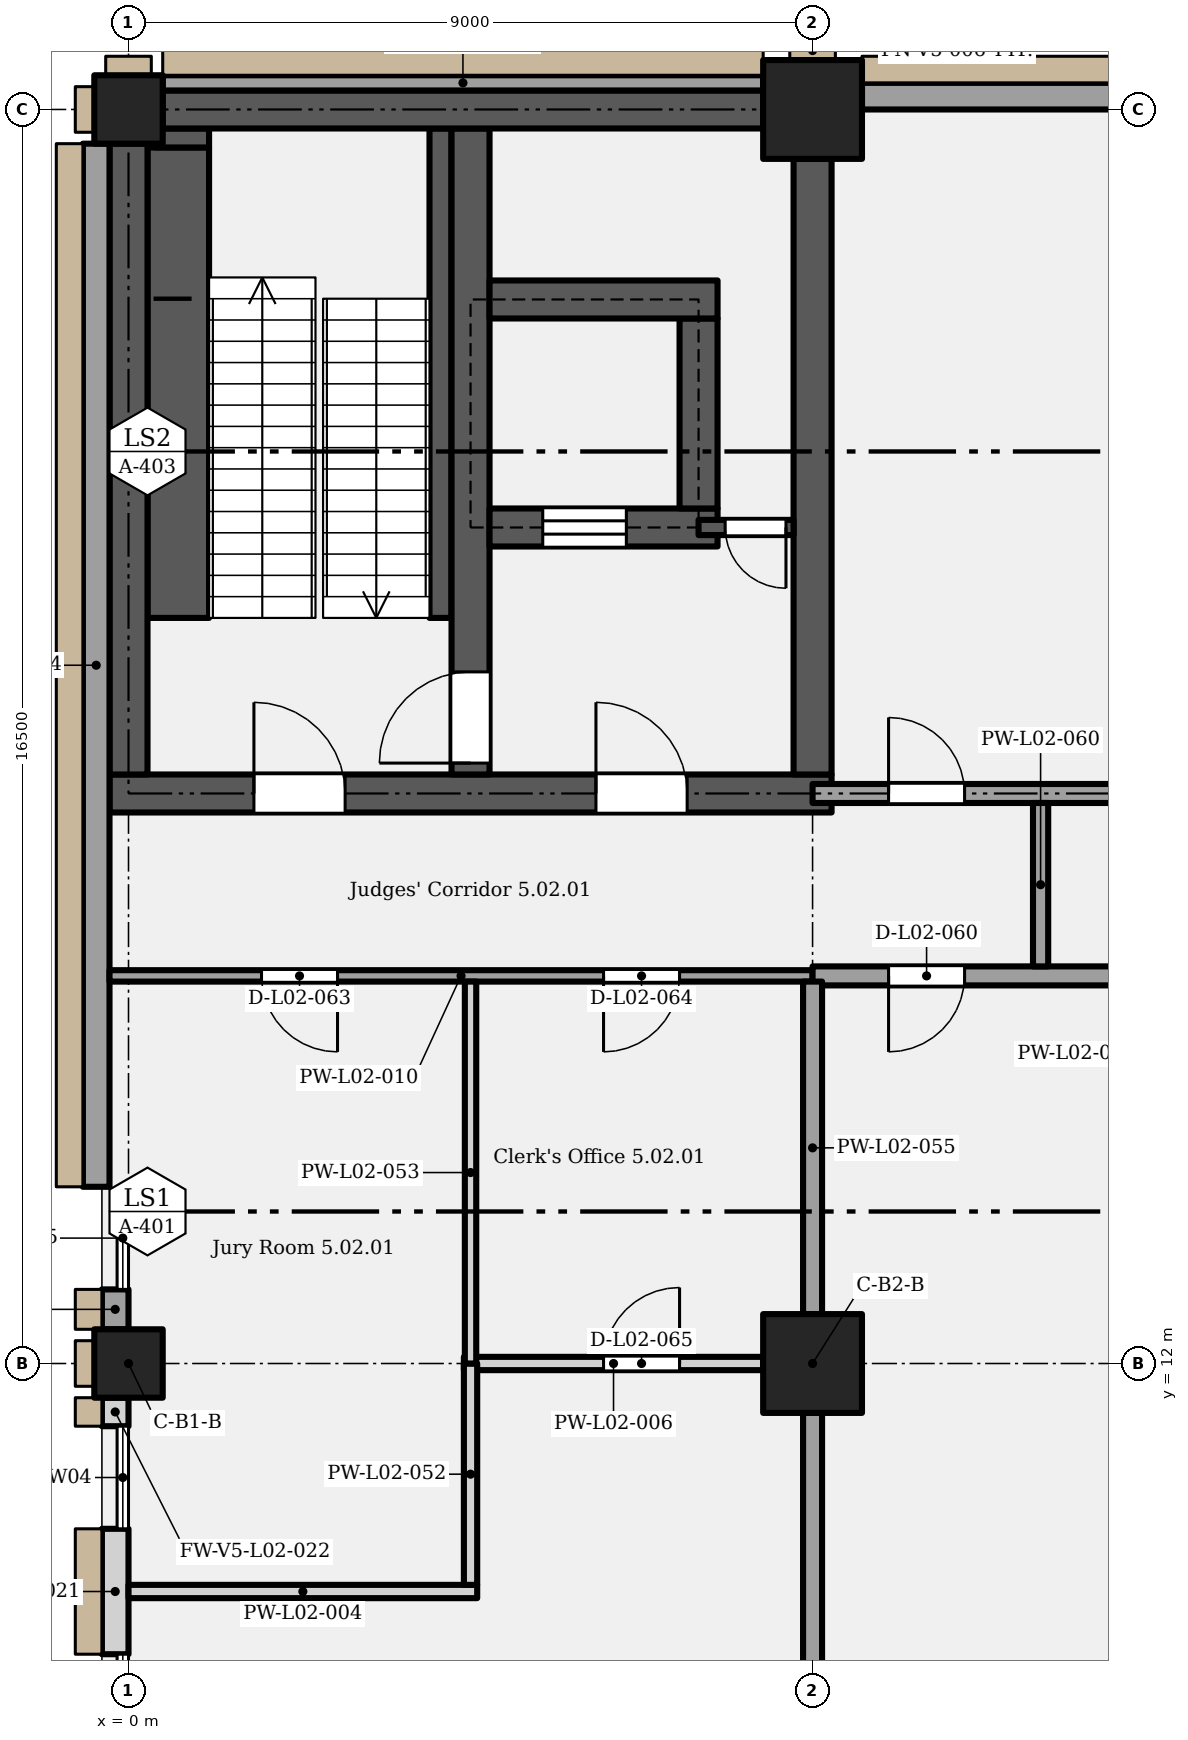
"""IFC4 building model, lengths in metres.
Left out: names, types, materials, properties, quantities, classifications, styles, units other than length and angle.
Written with IfcOpenShell. Run it as: python <this file> out.ifc"""

import sys

from ifc_helpers import new_model, si_unit, direction, frame, frame_2d, origin, origin_2d, place, context, subcontext, project, spatial, rectangle, extrude, element, fill, save


model = new_model("IFC4")
c1 = context("Model", 3, precision=1e-05, world=origin(), true_north=direction((0.0, 1.0)))
c2 = subcontext(c1, "Body", "Model", "MODEL_VIEW")
j1 = project(units=[si_unit("LENGTHUNIT", "METRE"), si_unit("PLANEANGLEUNIT", "RADIAN")], contexts=[c1])
p1 = place(None, origin())
s1 = spatial("IfcSite", under=j1, at=p1, CompositionType="ELEMENT")
p2 = place(p1, origin())
s2 = spatial("IfcBuilding", under=s1, at=p2, CompositionType="ELEMENT")
p3 = place(p2, frame((0.0, 0.0, 12.0)))
s3 = spatial("IfcBuildingStorey", under=s2, at=p3, CompositionType="ELEMENT", Elevation=12.0)
p4 = place(p3, frame((0.0, 12.0, 0.0), z_axis=(0.0, 0.0, 1.0), x_axis=(1.0, 0.0, 0.0)))
e1 = element("IfcColumn", 1, at=p4, inside=s3, PredefinedType="COLUMN", context=c2, shape_type="SweptSolid", body=[
    extrude(rectangle(XDim=0.9, YDim=0.9, at=origin_2d()), origin(), (0.0, 0.0, 1.0), 5.4),
])
p5 = place(p3, frame((9.0, 12.0, 0.0), z_axis=(0.0, 0.0, 1.0), x_axis=(1.0, 0.0, 0.0)))
e2 = element("IfcColumn", 2, at=p5, inside=s3, PredefinedType="COLUMN", context=c2, shape_type="SweptSolid", body=[
    extrude(rectangle(XDim=1.3, YDim=1.3, at=origin_2d()), origin(), (0.0, 0.0, 1.0), 5.4),
])
p6 = place(p3, frame((0.0, 28.5, 0.0), z_axis=(0.0, 0.0, 1.0), x_axis=(1.0, 0.0, 0.0)))
e3 = element("IfcColumn", 3, at=p6, inside=s3, PredefinedType="COLUMN", context=c2, shape_type="SweptSolid", body=[
    extrude(rectangle(XDim=0.9, YDim=0.9, at=origin_2d()), origin(), (0.0, 0.0, 1.0), 5.4),
])
p7 = place(p3, frame((9.0, 28.5, 0.0), z_axis=(0.0, 0.0, 1.0), x_axis=(1.0, 0.0, 0.0)))
e4 = element("IfcColumn", 4, at=p7, inside=s3, PredefinedType="COLUMN", context=c2, shape_type="SweptSolid", body=[
    extrude(rectangle(XDim=1.3, YDim=1.3, at=origin_2d()), origin(), (0.0, 0.0, 1.0), 5.4),
])
p8 = place(p3, frame((-0.25, 19.5, 0.0), z_axis=(0.0, 0.0, 1.0), x_axis=(1.0, 0.0, 0.0)))
e5 = element("IfcWall", 5, at=p8, inside=s3, PredefinedType="SHEAR", context=c2, shape_type="SweptSolid", body=[
    extrude(rectangle(XDim=9.5, YDim=0.5, at=frame_2d((4.75, 0.0))), origin(), (0.0, 0.0, 1.0), 5.15),
])
p9 = place(p8, frame((1.9, 0.0, 0.0)))
e6 = element("IfcOpeningElement", 6, at=p9, cuts=e5, PredefinedType="OPENING", context=c2, shape_type="SweptSolid", body=[
    extrude(rectangle(XDim=1.2, YDim=2.1, at=frame_2d((0.6, 1.05))), frame((0.0, 0.26, 0.0), z_axis=(0.0, -1.0, 0.0), x_axis=(1.0, 0.0, 0.0)), (0.0, 0.0, 1.0), 0.52),
])
p10 = place(p8, frame((6.4, 0.0, 0.0)))
e7 = element("IfcOpeningElement", 7, at=p10, cuts=e5, PredefinedType="OPENING", context=c2, shape_type="SweptSolid", body=[
    extrude(rectangle(XDim=1.2, YDim=2.1, at=frame_2d((0.6, 1.05))), frame((0.0, 0.26, 0.0), z_axis=(0.0, -1.0, 0.0), x_axis=(1.0, 0.0, 0.0)), (0.0, 0.0, 1.0), 0.52),
])
p11 = place(p3, frame((0.0, 19.75, 0.0), z_axis=(0.0, 0.0, 1.0), x_axis=(0.0, 1.0, 0.0)))
e8 = element("IfcWall", 8, at=p11, inside=s3, PredefinedType="SHEAR", context=c2, shape_type="SweptSolid", body=[
    extrude(rectangle(XDim=8.3, YDim=0.5, at=frame_2d((4.15, 0.0))), origin(), (0.0, 0.0, 1.0), 5.15),
])
p12 = place(p3, frame((4.5, 19.75, 0.0), z_axis=(0.0, 0.0, 1.0), x_axis=(0.0, 1.0, 0.0)))
e9 = element("IfcWall", 9, at=p12, inside=s3, PredefinedType="SHEAR", context=c2, shape_type="SweptSolid", body=[
    extrude(rectangle(XDim=8.5, YDim=0.5, at=frame_2d((4.25, 0.0))), origin(), (0.0, 0.0, 1.0), 5.15),
])
p13 = place(p12, frame((0.15, 0.0, 0.0)))
e10 = element("IfcOpeningElement", 10, at=p13, cuts=e9, PredefinedType="OPENING", context=c2, shape_type="SweptSolid", body=[
    extrude(rectangle(XDim=1.2, YDim=2.1, at=frame_2d((0.6, 1.05))), frame((0.0, 0.26, 0.0), z_axis=(0.0, -1.0, 0.0), x_axis=(1.0, 0.0, 0.0)), (0.0, 0.0, 1.0), 0.52),
])
p14 = place(p3, frame((9.0, 19.75, 0.0), z_axis=(0.0, 0.0, 1.0), x_axis=(0.0, 1.0, 0.0)))
e11 = element("IfcWall", 11, at=p14, inside=s3, PredefinedType="SHEAR", context=c2, shape_type="SweptSolid", body=[
    extrude(rectangle(XDim=8.1, YDim=0.5, at=frame_2d((4.05, 0.0))), origin(), (0.0, 0.0, 1.0), 5.15),
])
p15 = place(p3, frame((4.75, 23.0, 0.0), z_axis=(0.0, 0.0, 1.0), x_axis=(1.0, 0.0, 0.0)))
e12 = element("IfcWall", 12, at=p15, inside=s3, PredefinedType="SHEAR", context=c2, shape_type="SweptSolid", body=[
    extrude(rectangle(XDim=3.0, YDim=0.5, at=frame_2d((1.5, 0.0))), origin(), (0.0, 0.0, 1.0), 5.15),
])
p16 = place(p15, frame((0.7, 0.0, 0.0)))
e13 = element("IfcOpeningElement", 13, at=p16, cuts=e12, PredefinedType="OPENING", context=c2, shape_type="SweptSolid", body=[
    extrude(rectangle(XDim=1.1, YDim=2.1, at=frame_2d((0.55, 1.05))), frame((0.0, 0.26, 0.0), z_axis=(0.0, -1.0, 0.0), x_axis=(1.0, 0.0, 0.0)), (0.0, 0.0, 1.0), 0.52),
])
p17 = place(p3, frame((7.5, 23.25, 0.0), z_axis=(0.0, 0.0, 1.0), x_axis=(0.0, 1.0, 0.0)))
e14 = element("IfcWall", 14, at=p17, inside=s3, PredefinedType="SHEAR", context=c2, shape_type="SweptSolid", body=[
    extrude(rectangle(XDim=2.5, YDim=0.5, at=frame_2d((1.25, 0.0))), origin(), (0.0, 0.0, 1.0), 5.15),
])
p18 = place(p3, frame((4.75, 26.0, 0.0), z_axis=(0.0, 0.0, 1.0), x_axis=(1.0, 0.0, 0.0)))
e15 = element("IfcWall", 15, at=p18, inside=s3, PredefinedType="SHEAR", context=c2, shape_type="SweptSolid", body=[
    extrude(rectangle(XDim=3.0, YDim=0.5, at=frame_2d((1.5, 0.0))), origin(), (0.0, 0.0, 1.0), 5.15),
])
p19 = place(p3, frame((0.45, 28.5, 0.0), z_axis=(0.0, 0.0, 1.0), x_axis=(1.0, 0.0, 0.0)))
e16 = element("IfcWall", 16, at=p19, inside=s3, PredefinedType="SHEAR", context=c2, shape_type="SweptSolid", body=[
    extrude(rectangle(XDim=7.9, YDim=0.5, at=frame_2d((3.95, 0.0))), origin(), (0.0, 0.0, 1.0), 5.15),
])
p20 = place(p3, frame((0.45, 28.85, 0.0), z_axis=(0.0, 0.0, 1.0), x_axis=(1.0, 0.0, 0.0)))
e17 = element("IfcWall", 17, at=p20, inside=s3, PredefinedType="SOLIDWALL", context=c2, shape_type="SweptSolid", body=[
    extrude(rectangle(XDim=7.9, YDim=0.2, at=frame_2d((3.95, 0.0))), origin(), (0.0, 0.0, 1.0), 5.15),
])
p21 = place(p3, frame((9.65, 28.675, 0.0), z_axis=(0.0, 0.0, 1.0), x_axis=(1.0, 0.0, 0.0)))
e18 = element("IfcWall", 18, at=p21, inside=s3, PredefinedType="SOLIDWALL", context=c2, shape_type="SweptSolid", body=[
    extrude(rectangle(XDim=7.7, YDim=0.35, at=frame_2d((3.85, 0.0))), origin(), (0.0, 0.0, 1.0), 5.15),
])
p22 = place(p3, frame((-0.175, 8.175, 0.0), z_axis=(0.0, 0.0, 1.0), x_axis=(0.0, 1.0, 0.0)))
e19 = element("IfcWall", 19, at=p22, inside=s3, PredefinedType="SOLIDWALL", context=c2, shape_type="SweptSolid", body=[
    extrude(rectangle(XDim=1.65, YDim=0.35, at=frame_2d((0.825, 0.0))), origin(), (0.0, 0.0, 1.0), 5.15),
])
p23 = place(p3, frame((-0.175, 11.175, 0.0), z_axis=(0.0, 0.0, 1.0), x_axis=(0.0, 1.0, 0.0)))
e20 = element("IfcWall", 20, at=p23, inside=s3, PredefinedType="SOLIDWALL", context=c2, shape_type="SweptSolid", body=[
    extrude(rectangle(XDim=0.375, YDim=0.35, at=frame_2d((0.188, 0.0))), origin(), (0.0, 0.0, 1.0), 5.15),
])
p24 = place(p3, frame((-0.175, 12.45, 0.0), z_axis=(0.0, 0.0, 1.0), x_axis=(0.0, 1.0, 0.0)))
e21 = element("IfcWall", 21, at=p24, inside=s3, PredefinedType="SOLIDWALL", context=c2, shape_type="SweptSolid", body=[
    extrude(rectangle(XDim=0.525, YDim=0.35, at=frame_2d((0.263, 0.0))), origin(), (0.0, 0.0, 1.0), 5.15),
])
p25 = place(p3, frame((-0.425, 14.325, 0.0), z_axis=(0.0, 0.0, 1.0), x_axis=(0.0, 1.0, 0.0)))
e22 = element("IfcWall", 22, at=p25, inside=s3, PredefinedType="SOLIDWALL", context=c2, shape_type="SweptSolid", body=[
    extrude(rectangle(XDim=13.725, YDim=0.35, at=frame_2d((6.863, 0.0))), origin(), (0.0, 0.0, 1.0), 5.15),
])
p26 = place(p3, frame((0.0, 9.0, 0.0), z_axis=(0.0, 0.0, 1.0), x_axis=(1.0, 0.0, 0.0)))
e23 = element("IfcWall", 23, at=p26, inside=s3, PredefinedType="PARTITIONING", context=c2, shape_type="SweptSolid", body=[
    extrude(rectangle(XDim=4.587, YDim=0.175, at=frame_2d((2.294, 0.0))), origin(), (0.0, 0.0, 1.0), 5.15),
])
p27 = place(p3, frame((4.413, 12.0, 0.0), z_axis=(0.0, 0.0, 1.0), x_axis=(1.0, 0.0, 0.0)))
e24 = element("IfcWall", 24, at=p27, inside=s3, PredefinedType="PARTITIONING", context=c2, shape_type="SweptSolid", body=[
    extrude(rectangle(XDim=3.938, YDim=0.175, at=frame_2d((1.969, 0.0))), origin(), (0.0, 0.0, 1.0), 4.4),
])
p28 = place(p27, frame((1.837, 0.0, 0.0)))
e25 = element("IfcOpeningElement", 25, at=p28, cuts=e24, PredefinedType="OPENING", context=c2, shape_type="SweptSolid", body=[
    extrude(rectangle(XDim=1.0, YDim=2.1, at=frame_2d((0.5, 1.05))), frame((0.0, 0.097, 0.0), z_axis=(0.0, -1.0, 0.0), x_axis=(1.0, 0.0, 0.0)), (0.0, 0.0, 1.0), 0.195),
])
p29 = place(p3, frame((-0.25, 17.1, 0.0), z_axis=(0.0, 0.0, 1.0), x_axis=(1.0, 0.0, 0.0)))
e26 = element("IfcWall", 26, at=p29, inside=s3, PredefinedType="PARTITIONING", context=c2, shape_type="SweptSolid", body=[
    extrude(rectangle(XDim=9.25, YDim=0.15, at=frame_2d((4.625, 0.0))), origin(), (0.0, 0.0, 1.0), 5.15),
])
p30 = place(p29, frame((3.0, 0.0, 0.0), z_axis=(0.0, 0.0, 1.0), x_axis=(-1.0, 0.0, 0.0)))
e27 = element("IfcOpeningElement", 27, at=p30, cuts=e26, PredefinedType="OPENING", context=c2, shape_type="SweptSolid", body=[
    extrude(rectangle(XDim=1.0, YDim=2.1, at=frame_2d((0.5, 1.05))), frame((0.0, 0.085, 0.0), z_axis=(0.0, -1.0, 0.0), x_axis=(1.0, 0.0, 0.0)), (0.0, 0.0, 1.0), 0.17),
])
p31 = place(p29, frame((7.5, 0.0, 0.0), z_axis=(0.0, 0.0, 1.0), x_axis=(-1.0, 0.0, 0.0)))
e28 = element("IfcOpeningElement", 28, at=p31, cuts=e26, PredefinedType="OPENING", context=c2, shape_type="SweptSolid", body=[
    extrude(rectangle(XDim=1.0, YDim=2.1, at=frame_2d((0.5, 1.05))), frame((0.0, 0.085, 0.0), z_axis=(0.0, -1.0, 0.0), x_axis=(1.0, 0.0, 0.0)), (0.0, 0.0, 1.0), 0.17),
])
p32 = place(p3, frame((9.0, 17.1, 0.0), z_axis=(0.0, 0.0, 1.0), x_axis=(1.0, 0.0, 0.0)))
e29 = element("IfcWall", 29, at=p32, inside=s3, PredefinedType="PARTITIONING", context=c2, shape_type="SweptSolid", body=[
    extrude(rectangle(XDim=9.0, YDim=0.25, at=frame_2d((4.5, 0.0))), origin(), (0.0, 0.0, 1.0), 5.15),
])
p33 = place(p32, frame((6.9, 0.0, 0.0), z_axis=(0.0, 0.0, 1.0), x_axis=(-1.0, 0.0, 0.0)))
e30 = element("IfcOpeningElement", 30, at=p33, cuts=e29, PredefinedType="OPENING", context=c2, shape_type="SweptSolid", body=[
    extrude(rectangle(XDim=1.8, YDim=2.4, at=frame_2d((0.9, 1.2))), frame((0.0, 0.135, 0.0), z_axis=(0.0, -1.0, 0.0), x_axis=(1.0, 0.0, 0.0)), (0.0, 0.0, 1.0), 0.27),
])
p34 = place(p32, frame((2.0, 0.0, 0.0), z_axis=(0.0, 0.0, 1.0), x_axis=(-1.0, 0.0, 0.0)))
e31 = element("IfcOpeningElement", 31, at=p34, cuts=e29, PredefinedType="OPENING", context=c2, shape_type="SweptSolid", body=[
    extrude(rectangle(XDim=1.0, YDim=2.1, at=frame_2d((0.5, 1.05))), frame((0.0, 0.135, 0.0), z_axis=(0.0, -1.0, 0.0), x_axis=(1.0, 0.0, 0.0)), (0.0, 0.0, 1.0), 0.27),
])
p35 = place(p3, frame((9.0, 19.5, 0.0), z_axis=(0.0, 0.0, 1.0), x_axis=(1.0, 0.0, 0.0)))
e32 = element("IfcWall", 32, at=p35, inside=s3, PredefinedType="PARTITIONING", context=c2, shape_type="SweptSolid", body=[
    extrude(rectangle(XDim=9.0, YDim=0.25, at=frame_2d((4.5, 0.0))), origin(), (0.0, 0.0, 1.0), 5.15),
])
p36 = place(p35, frame((5.1, 0.0, 0.0)))
e33 = element("IfcOpeningElement", 33, at=p36, cuts=e32, PredefinedType="OPENING", context=c2, shape_type="SweptSolid", body=[
    extrude(rectangle(XDim=1.8, YDim=2.4, at=frame_2d((0.9, 1.2))), frame((0.0, 0.135, 0.0), z_axis=(0.0, -1.0, 0.0), x_axis=(1.0, 0.0, 0.0)), (0.0, 0.0, 1.0), 0.27),
])
p37 = place(p35, frame((1.0, 0.0, 0.0)))
e34 = element("IfcOpeningElement", 34, at=p37, cuts=e32, PredefinedType="OPENING", context=c2, shape_type="SweptSolid", body=[
    extrude(rectangle(XDim=1.0, YDim=2.1, at=frame_2d((0.5, 1.05))), frame((0.0, 0.135, 0.0), z_axis=(0.0, -1.0, 0.0), x_axis=(1.0, 0.0, 0.0)), (0.0, 0.0, 1.0), 0.27),
])
p38 = place(p3, frame((7.5, 23.0, 0.0), z_axis=(0.0, 0.0, 1.0), x_axis=(1.0, 0.0, 0.0)))
e35 = element("IfcWall", 35, at=p38, inside=s3, PredefinedType="SHEAR", context=c2, shape_type="SweptSolid", body=[
    extrude(rectangle(XDim=1.25, YDim=0.2, at=frame_2d((0.625, 0.0))), origin(), (0.0, 0.0, 1.0), 5.15),
])
p39 = place(p38, frame((1.15, 0.0, 0.0), z_axis=(0.0, 0.0, 1.0), x_axis=(-1.0, 0.0, 0.0)))
e36 = element("IfcOpeningElement", 36, at=p39, cuts=e35, PredefinedType="OPENING", context=c2, shape_type="SweptSolid", body=[
    extrude(rectangle(XDim=0.8, YDim=2.0, at=frame_2d((0.4, 1.0))), frame((0.0, 0.11, 0.0), z_axis=(0.0, -1.0, 0.0), x_axis=(1.0, 0.0, 0.0)), (0.0, 0.0, 1.0), 0.22),
])
p40 = place(p3, frame((4.5, 9.087, 0.0), z_axis=(0.0, 0.0, 1.0), x_axis=(0.0, 1.0, 0.0)))
e37 = element("IfcWall", 37, at=p40, inside=s3, PredefinedType="PARTITIONING", context=c2, shape_type="SweptSolid", body=[
    extrude(rectangle(XDim=2.913, YDim=0.175, at=frame_2d((1.456, 0.0))), origin(), (0.0, 0.0, 1.0), 5.15),
])
p41 = place(p3, frame((4.5, 12.0, 0.0), z_axis=(0.0, 0.0, 1.0), x_axis=(0.0, 1.0, 0.0)))
e38 = element("IfcWall", 38, at=p41, inside=s3, PredefinedType="PARTITIONING", context=c2, shape_type="SweptSolid", body=[
    extrude(rectangle(XDim=5.025, YDim=0.15, at=frame_2d((2.512, 0.0))), origin(), (0.0, 0.0, 1.0), 5.15),
])
p42 = place(p3, frame((9.0, 0.65, 0.0), z_axis=(0.0, 0.0, 1.0), x_axis=(0.0, 1.0, 0.0)))
e39 = element("IfcWall", 39, at=p42, inside=s3, PredefinedType="PARTITIONING", context=c2, shape_type="SweptSolid", body=[
    extrude(rectangle(XDim=10.7, YDim=0.25, at=frame_2d((5.35, 0.0))), origin(), (0.0, 0.0, 1.0), 4.4),
])
p43 = place(p42, frame((5.85, 0.0, 0.0), z_axis=(0.0, 0.0, 1.0), x_axis=(-1.0, 0.0, 0.0)))
e40 = element("IfcOpeningElement", 40, at=p43, cuts=e39, PredefinedType="OPENING", context=c2, shape_type="SweptSolid", body=[
    extrude(rectangle(XDim=1.0, YDim=2.1, at=frame_2d((0.5, 1.05))), frame((0.0, 0.135, 0.0), z_axis=(0.0, -1.0, 0.0), x_axis=(1.0, 0.0, 0.0)), (0.0, 0.0, 1.0), 0.27),
])
p44 = place(p3, frame((9.0, 12.65, 0.0), z_axis=(0.0, 0.0, 1.0), x_axis=(0.0, 1.0, 0.0)))
e41 = element("IfcWall", 41, at=p44, inside=s3, PredefinedType="PARTITIONING", context=c2, shape_type="SweptSolid", body=[
    extrude(rectangle(XDim=4.375, YDim=0.25, at=frame_2d((2.188, 0.0))), origin(), (0.0, 0.0, 1.0), 4.2),
])
p45 = place(p3, frame((12.0, 17.225, 0.0), z_axis=(0.0, 0.0, 1.0), x_axis=(0.0, 1.0, 0.0)))
e42 = element("IfcWall", 42, at=p45, inside=s3, PredefinedType="PARTITIONING", context=c2, shape_type="SweptSolid", body=[
    extrude(rectangle(XDim=2.15, YDim=0.2, at=frame_2d((1.075, 0.0))), origin(), (0.0, 0.0, 1.0), 5.15),
])
p46 = place(p3, frame((0.655, 21.81, 0.0), z_axis=(0.0, 0.0, 1.0), x_axis=(0.0, 1.0, 0.0)))
e43 = element("IfcWall", 43, at=p46, inside=s3, PredefinedType="SHEAR", context=c2, shape_type="SweptSolid", body=[
    extrude(rectangle(XDim=6.19, YDim=0.81, at=frame_2d((3.095, 0.0))), origin(), (0.0, 0.0, 1.0), 2.587),
])
p47 = place(p3, frame((0.705, 28.0, 0.0), z_axis=(0.0, 0.0, 1.0), x_axis=(0.0, 1.0, 0.0)))
e44 = element("IfcWall", 44, at=p47, inside=s3, PredefinedType="SHEAR", context=c2, shape_type="SweptSolid", body=[
    extrude(rectangle(XDim=0.25, YDim=0.71, at=frame_2d((0.125, 0.0))), origin(), (0.0, 0.0, 1.0), 2.587),
])
p48 = place(p3, frame((4.105, 21.81, 0.0), z_axis=(0.0, 0.0, 1.0), x_axis=(0.0, 1.0, 0.0)))
e45 = element("IfcWall", 45, at=p48, inside=s3, PredefinedType="SHEAR", context=c2, shape_type="SweptSolid", body=[
    extrude(rectangle(XDim=6.44, YDim=0.29, at=frame_2d((3.22, 0.0))), origin(), (0.0, 0.0, 1.0), 2.587),
])
p49 = place(p9, origin())
e46 = element("IfcDoor", 46, at=p49, inside=s3, OperationType="SINGLE_SWING_LEFT", PredefinedType="DOOR", context=c2, shape_type="SweptSolid", body=[
    extrude(rectangle(XDim=1.2, YDim=2.1, at=frame_2d((0.6, 1.05))), frame((0.0, 0.025, 0.0), z_axis=(0.0, -1.0, 0.0), x_axis=(1.0, 0.0, 0.0)), (0.0, 0.0, 1.0), 0.05),
])
fill(e6, e46)
p50 = place(p13, origin())
e47 = element("IfcDoor", 47, at=p50, inside=s3, OperationType="SINGLE_SWING_LEFT", PredefinedType="DOOR", context=c2, shape_type="SweptSolid", body=[
    extrude(rectangle(XDim=1.2, YDim=2.1, at=frame_2d((0.6, 1.05))), frame((0.0, 0.025, 0.0), z_axis=(0.0, -1.0, 0.0), x_axis=(1.0, 0.0, 0.0)), (0.0, 0.0, 1.0), 0.05),
])
fill(e10, e47)
p51 = place(p10, origin())
e48 = element("IfcDoor", 48, at=p51, inside=s3, OperationType="SINGLE_SWING_LEFT", PredefinedType="DOOR", context=c2, shape_type="SweptSolid", body=[
    extrude(rectangle(XDim=1.2, YDim=2.1, at=frame_2d((0.6, 1.05))), frame((0.0, 0.025, 0.0), z_axis=(0.0, -1.0, 0.0), x_axis=(1.0, 0.0, 0.0)), (0.0, 0.0, 1.0), 0.05),
])
fill(e7, e48)
p52 = place(p16, origin())
e49 = element("IfcDoor", 49, at=p52, inside=s3, OperationType="SLIDING_TO_LEFT", PredefinedType="DOOR", context=c2, shape_type="SweptSolid", body=[
    extrude(rectangle(XDim=1.1, YDim=2.1, at=frame_2d((0.55, 1.05))), frame((0.0, 0.025, 0.0), z_axis=(0.0, -1.0, 0.0), x_axis=(1.0, 0.0, 0.0)), (0.0, 0.0, 1.0), 0.05),
])
fill(e13, e49)
p53 = place(p39, origin())
e50 = element("IfcDoor", 50, at=p53, inside=s3, OperationType="SINGLE_SWING_LEFT", PredefinedType="DOOR", context=c2, shape_type="SweptSolid", body=[
    extrude(rectangle(XDim=0.8, YDim=2.0, at=frame_2d((0.4, 1.0))), frame((0.0, 0.025, 0.0), z_axis=(0.0, -1.0, 0.0), x_axis=(1.0, 0.0, 0.0)), (0.0, 0.0, 1.0), 0.05),
])
fill(e36, e50)
p54 = place(p34, origin())
e51 = element("IfcDoor", 51, at=p54, inside=s3, OperationType="SINGLE_SWING_RIGHT", PredefinedType="DOOR", context=c2, shape_type="SweptSolid", body=[
    extrude(rectangle(XDim=1.0, YDim=2.1, at=frame_2d((0.5, 1.05))), frame((0.0, 0.025, 0.0), z_axis=(0.0, -1.0, 0.0), x_axis=(1.0, 0.0, 0.0)), (0.0, 0.0, 1.0), 0.05),
])
fill(e31, e51)
p55 = place(p37, origin())
e52 = element("IfcDoor", 52, at=p55, inside=s3, OperationType="SINGLE_SWING_LEFT", PredefinedType="DOOR", context=c2, shape_type="SweptSolid", body=[
    extrude(rectangle(XDim=1.0, YDim=2.1, at=frame_2d((0.5, 1.05))), frame((0.0, 0.025, 0.0), z_axis=(0.0, -1.0, 0.0), x_axis=(1.0, 0.0, 0.0)), (0.0, 0.0, 1.0), 0.05),
])
fill(e34, e52)
p56 = place(p30, origin())
e53 = element("IfcDoor", 53, at=p56, inside=s3, OperationType="SINGLE_SWING_LEFT", PredefinedType="DOOR", context=c2, shape_type="SweptSolid", body=[
    extrude(rectangle(XDim=1.0, YDim=2.1, at=frame_2d((0.5, 1.05))), frame((0.0, 0.025, 0.0), z_axis=(0.0, -1.0, 0.0), x_axis=(1.0, 0.0, 0.0)), (0.0, 0.0, 1.0), 0.05),
])
fill(e27, e53)
p57 = place(p31, origin())
e54 = element("IfcDoor", 54, at=p57, inside=s3, OperationType="SINGLE_SWING_RIGHT", PredefinedType="DOOR", context=c2, shape_type="SweptSolid", body=[
    extrude(rectangle(XDim=1.0, YDim=2.1, at=frame_2d((0.5, 1.05))), frame((0.0, 0.025, 0.0), z_axis=(0.0, -1.0, 0.0), x_axis=(1.0, 0.0, 0.0)), (0.0, 0.0, 1.0), 0.05),
])
fill(e28, e54)
p58 = place(p28, origin())
e55 = element("IfcDoor", 55, at=p58, inside=s3, OperationType="SINGLE_SWING_RIGHT", PredefinedType="DOOR", context=c2, shape_type="SweptSolid", body=[
    extrude(rectangle(XDim=1.0, YDim=2.1, at=frame_2d((0.5, 1.05))), frame((0.0, 0.025, 0.0), z_axis=(0.0, -1.0, 0.0), x_axis=(1.0, 0.0, 0.0)), (0.0, 0.0, 1.0), 0.05),
])
fill(e25, e55)
save(model, sys.argv[1])
